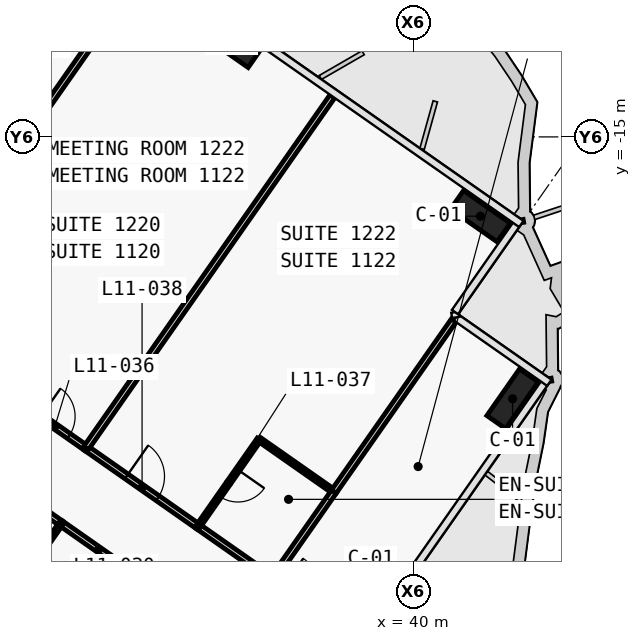
"""IFC4 building model, lengths in metres.
Left out: names, types, materials, properties, quantities, classifications, styles, units other than length and angle.
Written with IfcOpenShell. Run it as: python <this file> out.ifc"""

import sys

from ifc_helpers import new_model, si_unit, direction, frame, frame_2d, origin, origin_2d, place, context, subcontext, project, spatial, rectangle, extrude, element, fill, save


model = new_model("IFC4")
c1 = context("Model", 3, precision=1e-05, world=origin(), true_north=direction((0.0, 1.0)))
c2 = subcontext(c1, "Body", "Model", "MODEL_VIEW")
j1 = project(units=[si_unit("LENGTHUNIT", "METRE"), si_unit("PLANEANGLEUNIT", "RADIAN")], contexts=[c1])
p1 = place(None, origin())
s1 = spatial("IfcSite", under=j1, at=p1, CompositionType="ELEMENT")
p2 = place(p1, origin())
s2 = spatial("IfcBuilding", under=s1, at=p2, CompositionType="ELEMENT")
p3 = place(p2, frame((0.0, 0.0, 65.3)))
s3 = spatial("IfcBuildingStorey", under=s2, at=p3, CompositionType="ELEMENT", Elevation=65.3)
for number, where, z_axis, x_axis in (
    (1, (35.197, -12.498, 0.0), (0.0, 0.0, 1.0), (0.819, -0.574, 0.0)),
    (2, (41.75, -17.087, 0.0), (0.0, 0.0, 1.0), (0.819, -0.574, 0.0)),
    (3, (42.597, -21.892, 0.0), (0.0, 0.0, 1.0), (0.574, 0.819, 0.0)),
):
    element("IfcColumn", number, at=place(p3, frame(where, z_axis=z_axis, x_axis=x_axis)), inside=s3, PredefinedType="COLUMN", context=c2, shape_type="SweptSolid", body=[
        extrude(rectangle(XDim=1.5, YDim=0.6, at=origin_2d()), origin(), (0.0, 0.0, 1.0), 3.6),
    ])
p4 = place(p3, frame((26.457, -19.746, 0.0), z_axis=(0.0, 0.0, 1.0), x_axis=(0.819165052243, -0.573557858619, 0.0)))
e4 = element("IfcWall", 4, at=p4, inside=s3, PredefinedType="PARTITIONING", context=c2, shape_type="SweptSolid", body=[
    extrude(rectangle(XDim=6.004, YDim=0.15, at=frame_2d((3.002, 0.0))), origin(), (0.0, 0.0, 1.0), 2.6),
])
p5 = place(p4, frame((4.552, 0.0, 0.0)))
e5 = element("IfcOpeningElement", 5, at=p5, cuts=e4, PredefinedType="OPENING", context=c2, shape_type="SweptSolid", body=[
    extrude(rectangle(XDim=0.9, YDim=2.1, at=frame_2d((0.45, 1.05))), frame((0.0, 0.085, 0.0), z_axis=(0.0, -1.0, 0.0), x_axis=(1.0, 0.0, 0.0)), (0.0, 0.0, 1.0), 0.17),
])
p6 = place(p3, frame((31.372, -23.188, 0.0), z_axis=(0.0, 0.0, 1.0), x_axis=(0.819145961204, -0.573585123798, 0.0)))
e6 = element("IfcWall", 6, at=p6, inside=s3, PredefinedType="PARTITIONING", context=c2, shape_type="SweptSolid", body=[
    extrude(rectangle(XDim=3.603, YDim=0.15, at=frame_2d((1.802, 0.0))), origin(), (0.0, 0.0, 1.0), 3.32),
])
p7 = place(p6, frame((1.302, 0.0, 0.0)))
e7 = element("IfcOpeningElement", 7, at=p7, cuts=e6, PredefinedType="OPENING", context=c2, shape_type="SweptSolid", body=[
    extrude(rectangle(XDim=1.0, YDim=2.1, at=frame_2d((0.5, 1.05))), frame((0.0, 0.085, 0.0), z_axis=(0.0, -1.0, 0.0), x_axis=(1.0, 0.0, 0.0)), (0.0, 0.0, 1.0), 0.17),
])
p8 = place(p3, frame((34.321, -25.252, 0.0), z_axis=(0.0, 0.0, 1.0), x_axis=(0.819160338113, -0.573564591361, 0.0)))
e8 = element("IfcWall", 8, at=p8, inside=s3, PredefinedType="PARTITIONING", context=c2, shape_type="SweptSolid", body=[
    extrude(rectangle(XDim=2.404, YDim=0.15, at=frame_2d((1.202, 0.0))), origin(), (0.0, 0.0, 1.0), 3.32),
])
p9 = place(p3, frame((30.719, -25.172, 0.0), z_axis=(0.0, 0.0, 1.0), x_axis=(-0.819145961204, 0.573585123798, 0.0)))
e9 = element("IfcWall", 9, at=p9, inside=s3, PredefinedType="PARTITIONING", context=c2, shape_type="SweptSolid", body=[
    extrude(rectangle(XDim=3.603, YDim=0.15, at=frame_2d((1.802, 0.0))), origin(), (0.0, 0.0, 1.0), 2.6),
])
p10 = place(p9, frame((1.301, 0.0, 0.0)))
e10 = element("IfcOpeningElement", 10, at=p10, cuts=e9, PredefinedType="OPENING", context=c2, shape_type="SweptSolid", body=[
    extrude(rectangle(XDim=1.0, YDim=2.1, at=frame_2d((0.5, 1.05))), frame((0.0, 0.085, 0.0), z_axis=(0.0, -1.0, 0.0), x_axis=(1.0, 0.0, 0.0)), (0.0, 0.0, 1.0), 0.17),
])
p11 = place(p3, frame((32.685, -26.549, 0.0), z_axis=(0.0, 0.0, 1.0), x_axis=(-0.819146032251, 0.573585022335, 0.0)))
e11 = element("IfcWall", 11, at=p11, inside=s3, PredefinedType="PARTITIONING", context=c2, shape_type="SweptSolid", body=[
    extrude(rectangle(XDim=2.404, YDim=0.15, at=frame_2d((1.202, 0.0))), origin(), (0.0, 0.0, 1.0), 3.32),
])
p12 = place(p3, frame((32.94, -10.491, 0.0), z_axis=(0.0, 0.0, 1.0), x_axis=(-0.573593433868, -0.819140142237, 0.0)))
e12 = element("IfcWall", 12, at=p12, inside=s3, PredefinedType="PARTITIONING", context=c2, shape_type="SweptSolid", body=[
    extrude(rectangle(XDim=8.499, YDim=0.15, at=frame_2d((4.25, 0.0))), origin(), (0.0, 0.0, 1.0), 2.6),
])
p13 = place(p3, frame((37.855, -13.932, 0.0), z_axis=(0.0, 0.0, 1.0), x_axis=(-0.573571089604, -0.819155788095, 0.0)))
e13 = element("IfcWall", 13, at=p13, inside=s3, PredefinedType="PARTITIONING", context=c2, shape_type="SweptSolid", body=[
    extrude(rectangle(XDim=11.3, YDim=0.15, at=frame_2d((5.65, 0.0))), origin(), (0.0, 0.0, 1.0), 2.5),
])
p14 = place(p3, frame((37.895, -24.336, 0.0), z_axis=(0.0, 0.0, 1.0), x_axis=(-0.819141114317, 0.573592045652, 0.0)))
e14 = element("IfcWall", 14, at=p14, inside=s3, PredefinedType="PARTITIONING", context=c2, shape_type="SweptSolid", body=[
    extrude(rectangle(XDim=2.4, YDim=0.12, at=frame_2d((1.2, 0.0))), origin(), (0.0, 0.0, 1.0), 3.32),
])
p15 = place(p3, frame((35.927, -22.959, 0.0), z_axis=(0.0, 0.0, 1.0), x_axis=(-0.573550118428, -0.819170471667, 0.0)))
e15 = element("IfcWall", 15, at=p15, inside=s3, PredefinedType="PARTITIONING", context=c2, shape_type="SweptSolid", body=[
    extrude(rectangle(XDim=2.8, YDim=0.12, at=frame_2d((1.4, 0.0))), origin(), (0.0, 0.0, 1.0), 2.6),
])
p16 = place(p15, frame((0.975, 0.0, 0.0)))
e16 = element("IfcOpeningElement", 16, at=p16, cuts=e15, PredefinedType="OPENING", context=c2, shape_type="SweptSolid", body=[
    extrude(rectangle(XDim=0.85, YDim=2.05, at=frame_2d((0.425, 1.025))), frame((0.0, 0.07, 0.0), z_axis=(0.0, -1.0, 0.0), x_axis=(1.0, 0.0, 0.0)), (0.0, 0.0, 1.0), 0.14),
])
p17 = place(p3, frame((41.049, -19.831, 0.0), z_axis=(0.0, 0.0, 1.0), x_axis=(-0.573530875885, -0.819183944183, 0.0)))
e17 = element("IfcWall", 17, at=p17, inside=s3, PredefinedType="PARTITIONING", context=c2, shape_type="SweptSolid", body=[
    extrude(rectangle(XDim=5.499, YDim=0.15, at=frame_2d((2.75, 0.0))), origin(), (0.0, 0.0, 1.0), 3.32),
])
p18 = place(p3, frame((37.894, -24.336, 0.0), z_axis=(0.0, 0.0, 1.0), x_axis=(-0.573550118428, -0.819170471667, 0.0)))
e18 = element("IfcWall", 18, at=p18, inside=s3, PredefinedType="PARTITIONING", context=c2, shape_type="SweptSolid", body=[
    extrude(rectangle(XDim=2.8, YDim=0.15, at=frame_2d((1.4, 0.0))), origin(), (0.0, 0.0, 1.0), 2.6),
])
p19 = place(p3, frame((30.717, -25.17, 0.0), z_axis=(0.0, 0.0, 1.0), x_axis=(-0.573550118428, -0.819170471667, 0.0)))
e19 = element("IfcWall", 19, at=p19, inside=s3, PredefinedType="PARTITIONING", context=c2, shape_type="SweptSolid", body=[
    extrude(rectangle(XDim=2.8, YDim=0.12, at=frame_2d((1.4, 0.0))), origin(), (0.0, 0.0, 1.0), 3.32),
])
p20 = place(p19, frame((0.975, 0.0, 0.0)))
e20 = element("IfcOpeningElement", 20, at=p20, cuts=e19, PredefinedType="OPENING", context=c2, shape_type="SweptSolid", body=[
    extrude(rectangle(XDim=0.85, YDim=2.05, at=frame_2d((0.425, 1.025))), frame((0.0, 0.07, 0.0), z_axis=(0.0, -1.0, 0.0), x_axis=(1.0, 0.0, 0.0)), (0.0, 0.0, 1.0), 0.14),
])
p21 = place(p5, origin())
e21 = element("IfcDoor", 21, at=p21, inside=s3, OperationType="SINGLE_SWING_RIGHT", PredefinedType="DOOR", context=c2, shape_type="SweptSolid", body=[
    extrude(rectangle(XDim=0.9, YDim=2.1, at=frame_2d((0.45, 1.05))), frame((0.0, 0.025, 0.0), z_axis=(0.0, -1.0, 0.0), x_axis=(1.0, 0.0, 0.0)), (0.0, 0.0, 1.0), 0.05),
])
fill(e5, e21)
p22 = place(p16, origin())
e22 = element("IfcDoor", 22, at=p22, inside=s3, OperationType="SINGLE_SWING_LEFT", PredefinedType="DOOR", context=c2, shape_type="SweptSolid", body=[
    extrude(rectangle(XDim=0.85, YDim=2.05, at=frame_2d((0.425, 1.025))), frame((0.0, 0.025, 0.0), z_axis=(0.0, -1.0, 0.0), x_axis=(1.0, 0.0, 0.0)), (0.0, 0.0, 1.0), 0.05),
])
fill(e16, e22)
p23 = place(p7, origin())
e23 = element("IfcDoor", 23, at=p23, inside=s3, OperationType="SINGLE_SWING_RIGHT", PredefinedType="DOOR", context=c2, shape_type="SweptSolid", body=[
    extrude(rectangle(XDim=1.0, YDim=2.1, at=frame_2d((0.5, 1.05))), frame((0.0, 0.025, 0.0), z_axis=(0.0, -1.0, 0.0), x_axis=(1.0, 0.0, 0.0)), (0.0, 0.0, 1.0), 0.05),
])
fill(e7, e23)
save(model, sys.argv[1])
